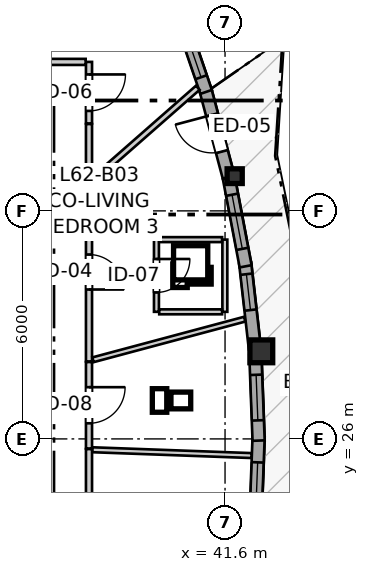
"""IFC4 building model, lengths in metres.
Left out: names, types, materials, properties, quantities, classifications, styles, units other than length and angle.
Written with IfcOpenShell. Run it as: python <this file> out.ifc"""

import sys

from ifc_helpers import new_model, si_unit, direction, frame, frame_2d, origin, origin_2d, place, context, subcontext, project, spatial, rectangle, i_section, extrude, source, transform, mapped, element, fill, save


model = new_model("IFC4")
c1 = context("Model", 3, precision=1e-05, world=origin(), true_north=direction((0.0, 1.0)))
c2 = subcontext(c1, "Body", "Model", "MODEL_VIEW")
j1 = project(units=[si_unit("LENGTHUNIT", "METRE"), si_unit("PLANEANGLEUNIT", "RADIAN")], contexts=[c1])
p1 = place(None, origin())
s1 = spatial("IfcSite", under=j1, at=p1, CompositionType="ELEMENT")
p2 = place(p1, origin())
s2 = spatial("IfcBuilding", under=s1, at=p2, CompositionType="ELEMENT")
p3 = place(p2, frame((0.0, 0.0, 208.4)))
s3 = spatial("IfcBuildingStorey", under=s2, at=p3, CompositionType="ELEMENT", Elevation=208.4)
m1 = source(origin(), c2, "Body", "SweptSolid", [
    extrude(rectangle(XDim=0.6, YDim=0.6, at=origin_2d()), origin(), (0.0, 0.0, 1.0), 2.935),
])
p4 = place(p3, frame((42.554, 28.304, 0.0), z_axis=(0.0, 0.0, 1.0), x_axis=(1.0, 0.0, 0.0)))
e1 = element("IfcColumn", 1, at=p4, inside=s3, PredefinedType="COLUMN", context=c2, shape_type="MappedRepresentation", body=[
    mapped(m1, transform((0.0, 0.0, 0.0), x_axis=(1.0, 0.0, 0.0), y_axis=(0.0, 1.0, 0.0), z_axis=(0.0, 0.0, 1.0), scale=1.0)),
])
m2 = source(origin(), c2, "Body", "SweptSolid", [
    extrude(i_section(OverallWidth=0.398, OverallDepth=0.387, WebThickness=0.019, FlangeThickness=0.03, FilletRadius=0.015, at=origin_2d()), origin(), (0.0, 0.0, 1.0), 2.935),
])
p5 = place(p3, frame((41.854, 32.914, 0.0), z_axis=(0.0, 0.0, 1.0), x_axis=(1.0, 0.0, 0.0)))
e2 = element("IfcColumn", 2, at=p5, inside=s3, PredefinedType="PILASTER", context=c2, shape_type="MappedRepresentation", body=[
    mapped(m2, transform((0.0, 0.0, 0.0), x_axis=(1.0, 0.0, 0.0), y_axis=(0.0, 1.0, 0.0), z_axis=(0.0, 0.0, 1.0), scale=1.0)),
])
p6 = place(p3, frame((42.395, 23.722, 0.0), z_axis=(0.0, 0.0, 1.0), x_axis=(0.038025668885, 0.999276762717, 0.0)))
e3 = element("IfcWall", 3, at=p6, inside=s3, PredefinedType="SOLIDWALL", context=c2, shape_type="SweptSolid", body=[
    extrude(rectangle(XDim=2.324, YDim=0.32, at=frame_2d((1.162, 0.0))), origin(), (0.0, 0.0, 1.0), 2.555),
])
p7 = place(p6, frame((0.312, 0.0, 0.82)))
e4 = element("IfcOpeningElement", 4, at=p7, cuts=e3, PredefinedType="OPENING", context=c2, shape_type="SweptSolid", body=[
    extrude(rectangle(XDim=1.35, YDim=1.45, at=frame_2d((0.675, 0.725))), frame((0.0, 0.17, 0.0), z_axis=(0.0, -1.0, 0.0), x_axis=(1.0, 0.0, 0.0)), (0.0, 0.0, 1.0), 0.34),
])
p8 = place(p3, frame((42.483, 25.956, 0.0), z_axis=(0.0, 0.0, 1.0), x_axis=(-0.038013039165, 0.999277243238, 0.0)))
e5 = element("IfcWall", 5, at=p8, inside=s3, PredefinedType="SOLIDWALL", context=c2, shape_type="SweptSolid", body=[
    extrude(rectangle(XDim=2.254, YDim=0.32, at=frame_2d((1.127, 0.0))), origin(), (0.0, 0.0, 1.0), 2.555),
])
p9 = place(p8, frame((0.532, 0.0, 0.82)))
e6 = element("IfcOpeningElement", 6, at=p9, cuts=e5, PredefinedType="OPENING", context=c2, shape_type="SweptSolid", body=[
    extrude(rectangle(XDim=1.2, YDim=1.45, at=frame_2d((0.6, 0.725))), frame((0.0, 0.17, 0.0), z_axis=(0.0, -1.0, 0.0), x_axis=(1.0, 0.0, 0.0)), (0.0, 0.0, 1.0), 0.34),
])
p10 = place(p3, frame((42.385, 28.376, 0.0), z_axis=(0.0, 0.0, 1.0), x_axis=(-0.113267221285, 0.993564560853, 0.0)))
e7 = element("IfcWall", 7, at=p10, inside=s3, PredefinedType="SOLIDWALL", context=c2, shape_type="SweptSolid", body=[
    extrude(rectangle(XDim=2.268, YDim=0.32, at=frame_2d((1.134, 0.0))), origin(), (0.0, 0.0, 1.0), 2.555),
])
p11 = place(p10, frame((1.021, 0.0, 0.82)))
e8 = element("IfcOpeningElement", 8, at=p11, cuts=e7, PredefinedType="OPENING", context=c2, shape_type="SweptSolid", body=[
    extrude(rectangle(XDim=0.95, YDim=1.35, at=frame_2d((0.475, 0.675))), frame((0.0, 0.17, 0.0), z_axis=(0.0, -1.0, 0.0), x_axis=(1.0, 0.0, 0.0)), (0.0, 0.0, 1.0), 0.34),
])
p12 = place(p3, frame((42.141, 30.542, 0.0), z_axis=(0.0, 0.0, 1.0), x_axis=(-0.186632734065, 0.982429754525, 0.0)))
e9 = element("IfcWall", 9, at=p12, inside=s3, PredefinedType="SOLIDWALL", context=c2, shape_type="SweptSolid", body=[
    extrude(rectangle(XDim=2.364, YDim=0.32, at=frame_2d((1.182, 0.0))), origin(), (0.0, 0.0, 1.0), 2.555),
])
p13 = place(p12, frame((0.467, 0.0, 0.82)))
e10 = element("IfcOpeningElement", 10, at=p13, cuts=e9, PredefinedType="OPENING", context=c2, shape_type="SweptSolid", body=[
    extrude(rectangle(XDim=1.45, YDim=1.25, at=frame_2d((0.725, 0.625))), frame((0.0, 0.17, 0.0), z_axis=(0.0, -1.0, 0.0), x_axis=(1.0, 0.0, 0.0)), (0.0, 0.0, 1.0), 0.34),
])
p14 = place(p3, frame((41.694, 32.892, 0.0), z_axis=(0.0, 0.0, 1.0), x_axis=(-0.257068132003, 0.966393282007, 0.0)))
e11 = element("IfcWall", 11, at=p14, inside=s3, PredefinedType="SOLIDWALL", context=c2, shape_type="SweptSolid", body=[
    extrude(rectangle(XDim=2.403, YDim=0.32, at=frame_2d((1.201, 0.0))), origin(), (0.0, 0.0, 1.0), 2.555),
])
p15 = place(p14, frame((0.691, 0.0, 0.0)))
e12 = element("IfcOpeningElement", 12, at=p15, cuts=e11, PredefinedType="OPENING", context=c2, shape_type="SweptSolid", body=[
    extrude(rectangle(XDim=1.0, YDim=2.1, at=frame_2d((0.5, 1.05))), frame((0.0, 0.17, 0.0), z_axis=(0.0, -1.0, 0.0), x_axis=(1.0, 0.0, 0.0)), (0.0, 0.0, 1.0), 0.34),
])
p16 = place(p3, frame((41.102, 35.13, 0.0), z_axis=(0.0, 0.0, 1.0), x_axis=(-0.323685265908, 0.946164810503, 0.0)))
e13 = element("IfcWall", 13, at=p16, inside=s3, PredefinedType="SOLIDWALL", context=c2, shape_type="SweptSolid", body=[
    extrude(rectangle(XDim=2.384, YDim=0.32, at=frame_2d((1.192, 0.0))), origin(), (0.0, 0.0, 1.0), 2.555),
])
p17 = place(p16, frame((0.408, 0.0, 0.82)))
e14 = element("IfcOpeningElement", 14, at=p17, cuts=e13, PredefinedType="OPENING", context=c2, shape_type="SweptSolid", body=[
    extrude(rectangle(XDim=1.6, YDim=1.35, at=frame_2d((0.8, 0.675))), frame((0.0, 0.17, 0.0), z_axis=(0.0, -1.0, 0.0), x_axis=(1.0, 0.0, 0.0)), (0.0, 0.0, 1.0), 0.34),
])
p18 = place(p3, frame((38.02, 32.748, 0.0), z_axis=(0.0, 0.0, 1.0), x_axis=(0.0, -1.0, 0.0)))
e15 = element("IfcWall", 15, at=p18, inside=s3, PredefinedType="PARTITIONING", context=c2, shape_type="SweptSolid", body=[
    extrude(rectangle(XDim=4.71, YDim=0.16, at=frame_2d((2.355, 0.0))), origin(), (0.0, 0.0, 1.0), 2.603),
])
p19 = place(p18, frame((1.897, 0.0, 0.0)))
e16 = element("IfcOpeningElement", 16, at=p19, cuts=e15, PredefinedType="OPENING", context=c2, shape_type="SweptSolid", body=[
    extrude(rectangle(XDim=0.92, YDim=2.1, at=frame_2d((0.46, 1.05))), frame((0.0, 0.09, 0.0), z_axis=(0.0, -1.0, 0.0), x_axis=(1.0, 0.0, 0.0)), (0.0, 0.0, 1.0), 0.18),
])
p20 = place(p3, frame((38.02, 25.733, 0.0), z_axis=(0.0, 0.0, 1.0), x_axis=(0.0, -1.0, 0.0)))
e17 = element("IfcWall", 17, at=p20, inside=s3, PredefinedType="PARTITIONING", context=c2, shape_type="SweptSolid", body=[
    extrude(rectangle(XDim=3.862, YDim=0.16, at=frame_2d((1.931, 0.0))), origin(), (0.0, 0.0, 1.0), 2.935),
])
p21 = place(p20, frame((1.47, 0.0, 0.0)))
e18 = element("IfcOpeningElement", 18, at=p21, cuts=e17, PredefinedType="OPENING", context=c2, shape_type="SweptSolid", body=[
    extrude(rectangle(XDim=0.92, YDim=2.1, at=frame_2d((0.46, 1.05))), frame((0.0, 0.09, 0.0), z_axis=(0.0, -1.0, 0.0), x_axis=(1.0, 0.0, 0.0)), (0.0, 0.0, 1.0), 0.18),
])
p22 = place(p3, frame((38.02, 28.023, 0.0), z_axis=(0.0, 0.0, 1.0), x_axis=(0.0, -1.0, 0.0)))
e19 = element("IfcWall", 19, at=p22, inside=s3, PredefinedType="PARTITIONING", context=c2, shape_type="SweptSolid", body=[
    extrude(rectangle(XDim=2.275, YDim=0.16, at=frame_2d((1.137, 0.0))), origin(), (0.0, 0.0, 1.0), 2.935),
])
p23 = place(p22, frame((0.662, 0.0, 0.0)))
e20 = element("IfcOpeningElement", 20, at=p23, cuts=e19, PredefinedType="OPENING", context=c2, shape_type="SweptSolid", body=[
    extrude(rectangle(XDim=0.95, YDim=2.1, at=frame_2d((0.475, 1.05))), frame((0.0, 0.09, 0.0), z_axis=(0.0, -1.0, 0.0), x_axis=(1.0, 0.0, 0.0)), (0.0, 0.0, 1.0), 0.18),
])
p24 = place(p3, frame((39.795, 31.244, 0.0), z_axis=(0.0, 0.0, 1.0), x_axis=(0.0, -1.0, 0.0)))
e21 = element("IfcWall", 21, at=p24, inside=s3, PredefinedType="PARTITIONING", context=c2, shape_type="SweptSolid", body=[
    extrude(rectangle(XDim=1.9, YDim=0.13, at=frame_2d((0.95, 0.0))), origin(), (0.0, 0.0, 1.0), 2.573),
])
p25 = place(p24, frame((0.51, 0.0, 0.0)))
e22 = element("IfcOpeningElement", 22, at=p25, cuts=e21, PredefinedType="OPENING", context=c2, shape_type="SweptSolid", body=[
    extrude(rectangle(XDim=0.88, YDim=2.05, at=frame_2d((0.44, 1.025))), frame((0.0, 0.075, 0.0), z_axis=(0.0, -1.0, 0.0), x_axis=(1.0, 0.0, 0.0)), (0.0, 0.0, 1.0), 0.15),
])
p26 = place(p3, frame((38.02, 35.92, 0.0), z_axis=(0.0, 0.0, 1.0), x_axis=(0.0, -1.0, 0.0)))
e23 = element("IfcWall", 23, at=p26, inside=s3, PredefinedType="PARTITIONING", context=c2, shape_type="SweptSolid", body=[
    extrude(rectangle(XDim=1.62, YDim=0.16, at=frame_2d((0.81, 0.0))), origin(), (0.0, 0.0, 1.0), 2.603),
])
p27 = place(p26, frame((0.33, 0.0, 0.0)))
e24 = element("IfcOpeningElement", 24, at=p27, cuts=e23, PredefinedType="OPENING", context=c2, shape_type="SweptSolid", body=[
    extrude(rectangle(XDim=0.96, YDim=2.1, at=frame_2d((0.48, 1.05))), frame((0.0, 0.09, 0.0), z_axis=(0.0, -1.0, 0.0), x_axis=(1.0, 0.0, 0.0)), (0.0, 0.0, 1.0), 0.18),
])
p28 = place(p3, frame((36.242, 36.044, 0.0), z_axis=(0.0, 0.0, 1.0), x_axis=(0.50599508157, 0.862536362959, 0.0)))
e25 = element("IfcWall", 25, at=p28, inside=s3, PredefinedType="PARTITIONING", context=c2, shape_type="SweptSolid", body=[
    extrude(rectangle(XDim=5.456, YDim=0.145, at=frame_2d((2.728, 0.0))), origin(), (0.0, 0.0, 1.0), 2.935),
])
p29 = place(p3, frame((38.11, 25.715, 0.0), z_axis=(0.0, 0.0, 1.0), x_axis=(0.99933433165, -0.036481414253, 0.0)))
e26 = element("IfcWall", 26, at=p29, inside=s3, PredefinedType="PARTITIONING", context=c2, shape_type="SweptSolid", body=[
    extrude(rectangle(XDim=4.189, YDim=0.13, at=frame_2d((2.095, 0.0))), origin(), (0.0, 0.0, 1.0), 2.935),
])
p30 = place(p3, frame((38.125, 28.082, 0.0), z_axis=(0.0, 0.0, 1.0), x_axis=(0.965997321458, 0.258552073934, 0.0)))
e27 = element("IfcWall", 27, at=p30, inside=s3, PredefinedType="PARTITIONING", context=c2, shape_type="SweptSolid", body=[
    extrude(rectangle(XDim=4.134, YDim=0.13, at=frame_2d((2.067, 0.0))), origin(), (0.0, 0.0, 1.0), 2.935),
])
p31 = place(p3, frame((38.154, 32.845, 0.0), z_axis=(0.0, 0.0, 1.0), x_axis=(0.751793032372, 0.659399148071, 0.0)))
e28 = element("IfcWall", 28, at=p31, inside=s3, PredefinedType="PARTITIONING", context=c2, shape_type="SweptSolid", body=[
    extrude(rectangle(XDim=3.631, YDim=0.145, at=frame_2d((1.815, 0.0))), origin(), (0.0, 0.0, 1.0), 2.935),
])
p32 = place(p3, frame((41.595, 29.344, 0.0), z_axis=(0.0, 0.0, 1.0), x_axis=(0.0, 1.0, 0.0)))
e29 = element("IfcWall", 29, at=p32, inside=s3, PredefinedType="PARTITIONING", context=c2, shape_type="SweptSolid", body=[
    extrude(rectangle(XDim=1.9, YDim=0.13, at=frame_2d((0.95, 0.0))), origin(), (0.0, 0.0, 1.0), 2.935),
])
for number, where, z_axis, x_axis in (
    (30, (39.868, 31.244, 0.0), (0.0, 0.0, 1.0), (1.0, 0.0, 0.0)),
    (31, (39.868, 29.344, 0.0), (0.0, 0.0, 1.0), (1.0, 0.0, 0.0)),
):
    element("IfcWall", number, at=place(p3, frame(where, z_axis=z_axis, x_axis=x_axis)), inside=s3, PredefinedType="PARTITIONING", context=c2, shape_type="SweptSolid", body=[
        extrude(rectangle(XDim=1.654, YDim=0.13, at=frame_2d((0.827, 0.0))), origin(), (0.0, 0.0, 1.0), 2.935),
    ])
p33 = place(p3, frame((36.4, 35.92, 0.0), z_axis=(0.0, 0.0, 1.0), x_axis=(1.0, 0.0, 0.0)))
e32 = element("IfcWall", 32, at=p33, inside=s3, PredefinedType="PARTITIONING", context=c2, shape_type="SweptSolid", body=[
    extrude(rectangle(XDim=1.532, YDim=0.16, at=frame_2d((0.766, 0.0))), origin(), (0.0, 0.0, 1.0), 2.935),
])
p34 = place(p3, frame((38.02, 32.938, 0.0), z_axis=(0.0, 0.0, 1.0), x_axis=(0.0, 1.0, 0.0)))
e33 = element("IfcWall", 33, at=p34, inside=s3, PredefinedType="PARTITIONING", context=c2, shape_type="SweptSolid", body=[
    extrude(rectangle(XDim=1.347, YDim=0.16, at=frame_2d((0.674, 0.0))), origin(), (0.0, 0.0, 1.0), 2.603),
])
m3 = source(origin(), c2, "Body", "SweptSolid", [
    extrude(rectangle(XDim=1.35, YDim=1.45, at=frame_2d((0.675, 0.725))), frame((0.0, 0.03, 0.0), z_axis=(0.0, -1.0, 0.0), x_axis=(1.0, 0.0, 0.0)), (0.0, 0.0, 1.0), 0.06),
])
p35 = place(p7, origin())
e34 = element("IfcWindow", 34, at=p35, inside=s3, PartitioningType="SINGLE_PANEL", PredefinedType="WINDOW", context=c2, shape_type="MappedRepresentation", body=[
    mapped(m3, transform((0.0, 0.0, 0.0), x_axis=(1.0, 0.0, 0.0), y_axis=(0.0, 1.0, 0.0), z_axis=(0.0, 0.0, 1.0), scale=1.0)),
])
fill(e4, e34)
m4 = source(origin(), c2, "Body", "SweptSolid", [
    extrude(rectangle(XDim=1.2, YDim=1.45, at=frame_2d((0.6, 0.725))), frame((0.0, 0.03, 0.0), z_axis=(0.0, -1.0, 0.0), x_axis=(1.0, 0.0, 0.0)), (0.0, 0.0, 1.0), 0.06),
])
p36 = place(p9, origin())
e35 = element("IfcWindow", 35, at=p36, inside=s3, PartitioningType="SINGLE_PANEL", PredefinedType="WINDOW", context=c2, shape_type="MappedRepresentation", body=[
    mapped(m4, transform((0.0, 0.0, 0.0), x_axis=(1.0, 0.0, 0.0), y_axis=(0.0, 1.0, 0.0), z_axis=(0.0, 0.0, 1.0), scale=1.0)),
])
fill(e6, e35)
m5 = source(origin(), c2, "Body", "SweptSolid", [
    extrude(rectangle(XDim=0.95, YDim=1.35, at=frame_2d((0.475, 0.675))), frame((0.0, 0.03, 0.0), z_axis=(0.0, -1.0, 0.0), x_axis=(1.0, 0.0, 0.0)), (0.0, 0.0, 1.0), 0.06),
])
p37 = place(p11, origin())
e36 = element("IfcWindow", 36, at=p37, inside=s3, PartitioningType="SINGLE_PANEL", PredefinedType="WINDOW", context=c2, shape_type="MappedRepresentation", body=[
    mapped(m5, transform((0.0, 0.0, 0.0), x_axis=(1.0, 0.0, 0.0), y_axis=(0.0, 1.0, 0.0), z_axis=(0.0, 0.0, 1.0), scale=1.0)),
])
fill(e8, e36)
m6 = source(origin(), c2, "Body", "SweptSolid", [
    extrude(rectangle(XDim=1.45, YDim=1.25, at=frame_2d((0.725, 0.625))), frame((0.0, 0.03, 0.0), z_axis=(0.0, -1.0, 0.0), x_axis=(1.0, 0.0, 0.0)), (0.0, 0.0, 1.0), 0.06),
])
p38 = place(p13, origin())
e37 = element("IfcWindow", 37, at=p38, inside=s3, PartitioningType="SINGLE_PANEL", PredefinedType="WINDOW", context=c2, shape_type="MappedRepresentation", body=[
    mapped(m6, transform((0.0, 0.0, 0.0), x_axis=(1.0, 0.0, 0.0), y_axis=(0.0, 1.0, 0.0), z_axis=(0.0, 0.0, 1.0), scale=1.0)),
])
fill(e10, e37)
m7 = source(origin(), c2, "Body", "SweptSolid", [
    extrude(rectangle(XDim=1.0, YDim=2.1, at=frame_2d((0.5, 1.05))), frame((0.0, 0.025, 0.0), z_axis=(0.0, -1.0, 0.0), x_axis=(1.0, 0.0, 0.0)), (0.0, 0.0, 1.0), 0.05),
])
p39 = place(p15, origin())
e38 = element("IfcDoor", 38, at=p39, inside=s3, OperationType="SINGLE_SWING_RIGHT", PredefinedType="DOOR", context=c2, shape_type="MappedRepresentation", body=[
    mapped(m7, transform((0.0, 0.0, 0.0), x_axis=(1.0, 0.0, 0.0), y_axis=(0.0, 1.0, 0.0), z_axis=(0.0, 0.0, 1.0), scale=1.0)),
])
fill(e12, e38)
m8 = source(origin(), c2, "Body", "SweptSolid", [
    extrude(rectangle(XDim=1.6, YDim=1.35, at=frame_2d((0.8, 0.675))), frame((0.0, 0.03, 0.0), z_axis=(0.0, -1.0, 0.0), x_axis=(1.0, 0.0, 0.0)), (0.0, 0.0, 1.0), 0.06),
])
p40 = place(p17, origin())
e39 = element("IfcWindow", 39, at=p40, inside=s3, PartitioningType="SINGLE_PANEL", PredefinedType="WINDOW", context=c2, shape_type="MappedRepresentation", body=[
    mapped(m8, transform((0.0, 0.0, 0.0), x_axis=(1.0, 0.0, 0.0), y_axis=(0.0, 1.0, 0.0), z_axis=(0.0, 0.0, 1.0), scale=1.0)),
])
fill(e14, e39)
m9 = source(origin(), c2, "Body", "SweptSolid", [
    extrude(rectangle(XDim=0.92, YDim=2.1, at=frame_2d((0.46, 1.05))), frame((0.0, 0.025, 0.0), z_axis=(0.0, -1.0, 0.0), x_axis=(1.0, 0.0, 0.0)), (0.0, 0.0, 1.0), 0.05),
])
p41 = place(p19, origin())
e40 = element("IfcDoor", 40, at=p41, inside=s3, OperationType="SINGLE_SWING_RIGHT", PredefinedType="DOOR", context=c2, shape_type="MappedRepresentation", body=[
    mapped(m9, transform((0.0, 0.0, 0.0), x_axis=(1.0, 0.0, 0.0), y_axis=(0.0, 1.0, 0.0), z_axis=(0.0, 0.0, 1.0), scale=1.0)),
])
fill(e16, e40)
m10 = source(origin(), c2, "Body", "SweptSolid", [
    extrude(rectangle(XDim=0.95, YDim=2.1, at=frame_2d((0.475, 1.05))), frame((0.0, 0.025, 0.0), z_axis=(0.0, -1.0, 0.0), x_axis=(1.0, 0.0, 0.0)), (0.0, 0.0, 1.0), 0.05),
])
p42 = place(p23, origin())
e41 = element("IfcDoor", 41, at=p42, inside=s3, OperationType="SINGLE_SWING_LEFT", PredefinedType="DOOR", context=c2, shape_type="MappedRepresentation", body=[
    mapped(m10, transform((0.0, 0.0, 0.0), x_axis=(1.0, 0.0, 0.0), y_axis=(0.0, 1.0, 0.0), z_axis=(0.0, 0.0, 1.0), scale=1.0)),
])
fill(e20, e41)
m11 = source(origin(), c2, "Body", "SweptSolid", [
    extrude(rectangle(XDim=0.88, YDim=2.05, at=frame_2d((0.44, 1.025))), frame((0.0, 0.025, 0.0), z_axis=(0.0, -1.0, 0.0), x_axis=(1.0, 0.0, 0.0)), (0.0, 0.0, 1.0), 0.05),
])
p43 = place(p25, origin())
e42 = element("IfcDoor", 42, at=p43, inside=s3, OperationType="SINGLE_SWING_LEFT", PredefinedType="DOOR", context=c2, shape_type="MappedRepresentation", body=[
    mapped(m11, transform((0.0, 0.0, 0.0), x_axis=(1.0, 0.0, 0.0), y_axis=(0.0, 1.0, 0.0), z_axis=(0.0, 0.0, 1.0), scale=1.0)),
])
fill(e22, e42)
m12 = source(origin(), c2, "Body", "SweptSolid", [
    extrude(rectangle(XDim=0.96, YDim=2.1, at=frame_2d((0.48, 1.05))), frame((0.0, 0.025, 0.0), z_axis=(0.0, -1.0, 0.0), x_axis=(1.0, 0.0, 0.0)), (0.0, 0.0, 1.0), 0.05),
])
p44 = place(p27, origin())
e43 = element("IfcDoor", 43, at=p44, inside=s3, OperationType="SINGLE_SWING_LEFT", PredefinedType="DOOR", context=c2, shape_type="MappedRepresentation", body=[
    mapped(m12, transform((0.0, 0.0, 0.0), x_axis=(1.0, 0.0, 0.0), y_axis=(0.0, 1.0, 0.0), z_axis=(0.0, 0.0, 1.0), scale=1.0)),
])
fill(e24, e43)
save(model, sys.argv[1])
